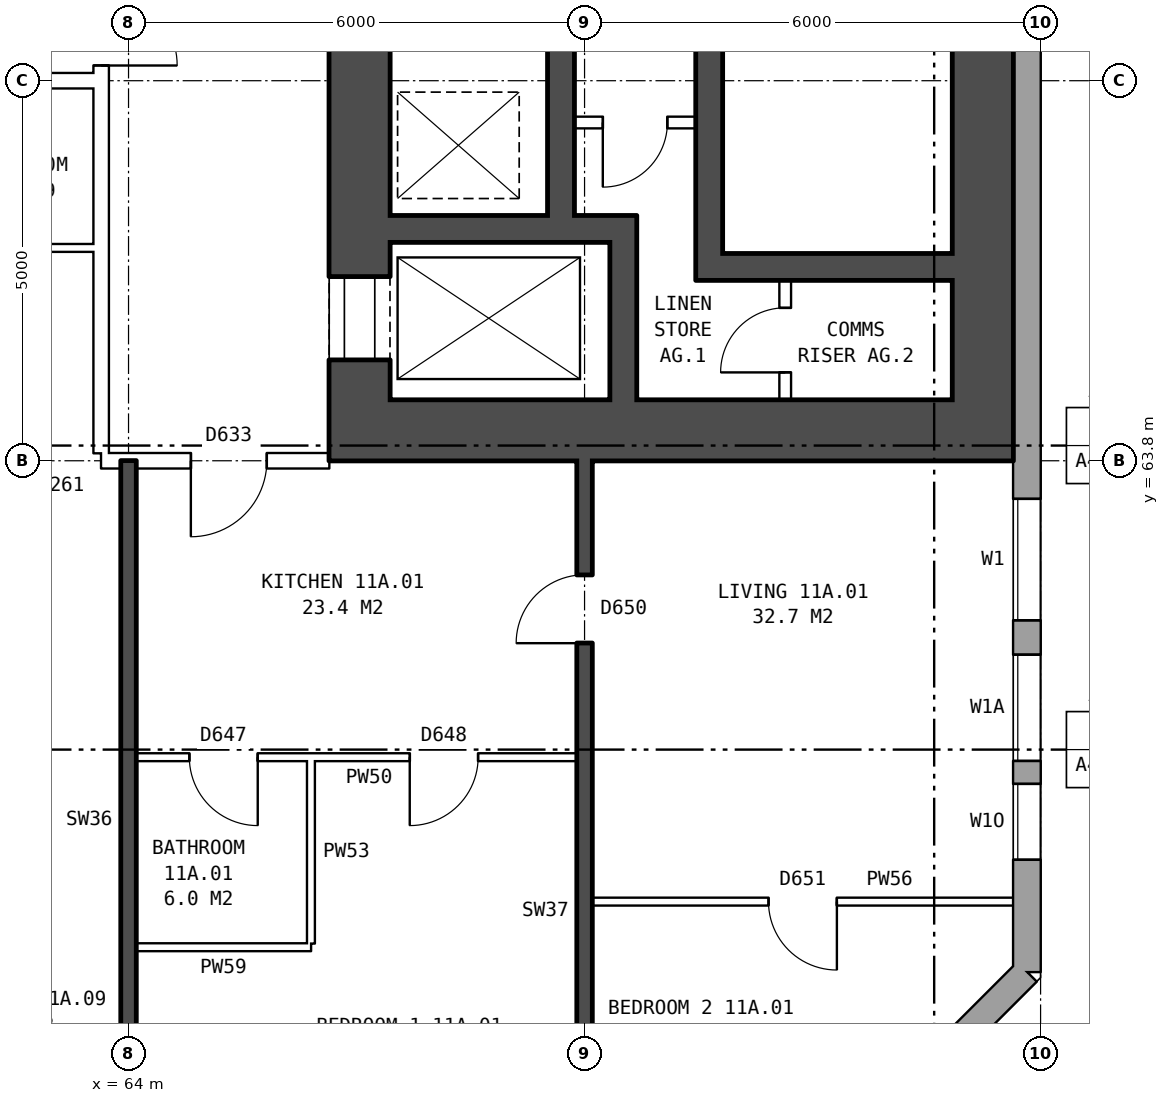
"""IFC4 building model, lengths in metres.
Left out: names, types, materials, properties, quantities, classifications, styles, units other than length and angle.
Written with IfcOpenShell. Run it as: python <this file> out.ifc"""

import sys

from ifc_helpers import new_model, si_unit, direction, frame, frame_2d, origin, place, context, subcontext, project, spatial, rectangle, extrude, element, fill, save


model = new_model("IFC4")
c1 = context("Model", 3, precision=1e-05, world=origin(), true_north=direction((0.0, 1.0)))
c2 = subcontext(c1, "Body", "Model", "MODEL_VIEW")
j1 = project(units=[si_unit("LENGTHUNIT", "METRE"), si_unit("PLANEANGLEUNIT", "RADIAN")], contexts=[c1])
p1 = place(None, origin())
s1 = spatial("IfcSite", under=j1, at=p1, CompositionType="ELEMENT")
p2 = place(p1, origin())
s2 = spatial("IfcBuilding", under=s1, at=p2, CompositionType="ELEMENT")
p3 = place(p2, frame((0.0, 0.0, 44.3)))
s3 = spatial("IfcBuildingStorey", under=s2, at=p3, CompositionType="ELEMENT", Elevation=44.3)
p4 = place(p3, frame((72.925, 54.18, 0.0), z_axis=(0.0, 0.0, 1.0), x_axis=(0.707106781187, 0.707106781187, 0.0)))
e1 = element("IfcWall", 1, at=p4, inside=s3, PredefinedType="STANDARD", context=c2, shape_type="SweptSolid", body=[
    extrude(rectangle(XDim=4.094, YDim=0.36, at=frame_2d((2.047, 0.0))), origin(), (0.0, 0.0, 1.0), 2.85),
])
p5 = place(p4, frame((1.247, 0.0, 0.8)))
e2 = element("IfcOpeningElement", 2, at=p5, cuts=e1, PredefinedType="OPENING", context=c2, shape_type="SweptSolid", body=[
    extrude(rectangle(XDim=1.6, YDim=1.8, at=frame_2d((0.8, 0.9))), frame((0.0, 0.19, 0.0), z_axis=(0.0, -1.0, 0.0), x_axis=(1.0, 0.0, 0.0)), (0.0, 0.0, 1.0), 0.38),
])
p6 = place(p3, frame((75.82, 57.075, 0.0), z_axis=(0.0, 0.0, 1.0), x_axis=(0.0, 1.0, 0.0)))
e3 = element("IfcWall", 3, at=p6, inside=s3, PredefinedType="STANDARD", context=c2, shape_type="SweptSolid", body=[
    extrude(rectangle(XDim=25.851, YDim=0.36, at=frame_2d((12.925, 0.0))), origin(), (0.0, 0.0, 1.0), 2.85),
])
p7 = place(p6, frame((1.475, 0.0, 0.8)))
e4 = element("IfcOpeningElement", 4, at=p7, cuts=e3, PredefinedType="OPENING", context=c2, shape_type="SweptSolid", body=[
    extrude(rectangle(XDim=1.0, YDim=1.2, at=frame_2d((0.5, 0.6))), frame((0.0, 0.19, 0.0), z_axis=(0.0, -1.0, 0.0), x_axis=(1.0, 0.0, 0.0)), (0.0, 0.0, 1.0), 0.38),
])
p8 = place(p6, frame((4.625, 0.0, 0.8)))
e5 = element("IfcOpeningElement", 5, at=p8, cuts=e3, PredefinedType="OPENING", context=c2, shape_type="SweptSolid", body=[
    extrude(rectangle(XDim=1.6, YDim=1.8, at=frame_2d((0.8, 0.9))), frame((0.0, 0.19, 0.0), z_axis=(0.0, -1.0, 0.0), x_axis=(1.0, 0.0, 0.0)), (0.0, 0.0, 1.0), 0.38),
])
p9 = place(p6, frame((19.625, 0.0, 0.8)))
e6 = element("IfcOpeningElement", 6, at=p9, cuts=e3, PredefinedType="OPENING", context=c2, shape_type="SweptSolid", body=[
    extrude(rectangle(XDim=1.6, YDim=1.8, at=frame_2d((0.8, 0.9))), frame((0.0, 0.19, 0.0), z_axis=(0.0, -1.0, 0.0), x_axis=(1.0, 0.0, 0.0)), (0.0, 0.0, 1.0), 0.38),
])
p10 = place(p6, frame((22.075, 0.0, 0.8)))
e7 = element("IfcOpeningElement", 7, at=p10, cuts=e3, PredefinedType="OPENING", context=c2, shape_type="SweptSolid", body=[
    extrude(rectangle(XDim=1.2, YDim=1.8, at=frame_2d((0.6, 0.9))), frame((0.0, 0.19, 0.0), z_axis=(0.0, -1.0, 0.0), x_axis=(1.0, 0.0, 0.0)), (0.0, 0.0, 1.0), 0.38),
])
p11 = place(p6, frame((2.775, 0.0, 0.8)))
e8 = element("IfcOpeningElement", 8, at=p11, cuts=e3, PredefinedType="OPENING", context=c2, shape_type="SweptSolid", body=[
    extrude(rectangle(XDim=1.4, YDim=1.8, at=frame_2d((0.7, 0.9))), frame((0.0, 0.19, 0.0), z_axis=(0.0, -1.0, 0.0), x_axis=(1.0, 0.0, 0.0)), (0.0, 0.0, 1.0), 0.38),
])
p12 = place(p6, frame((23.575, 0.0, 0.8)))
e9 = element("IfcOpeningElement", 9, at=p12, cuts=e3, PredefinedType="OPENING", context=c2, shape_type="SweptSolid", body=[
    extrude(rectangle(XDim=1.2, YDim=0.9, at=frame_2d((0.6, 0.45))), frame((0.0, 0.19, 0.0), z_axis=(0.0, -1.0, 0.0), x_axis=(1.0, 0.0, 0.0)), (0.0, 0.0, 1.0), 0.38),
])
p13 = place(p3, frame((67.04, 64.6, 0.0), z_axis=(0.0, 0.0, 1.0), x_axis=(0.0, 1.0, 0.0)))
e10 = element("IfcWall", 10, at=p13, inside=s3, PredefinedType="SHEAR", context=c2, shape_type="SweptSolid", body=[
    extrude(rectangle(XDim=10.8, YDim=0.8, at=frame_2d((5.4, 0.0))), origin(), (0.0, 0.0, 1.0), 2.85),
])
p14 = place(p13, frame((0.525, 0.0, 0.0)))
e11 = element("IfcOpeningElement", 11, at=p14, cuts=e10, PredefinedType="OPENING", context=c2, shape_type="SweptSolid", body=[
    extrude(rectangle(XDim=1.1, YDim=2.1, at=frame_2d((0.55, 1.05))), frame((0.0, 0.41, 0.0), z_axis=(0.0, -1.0, 0.0), x_axis=(1.0, 0.0, 0.0)), (0.0, 0.0, 1.0), 0.82),
])
p15 = place(p13, frame((9.1, 0.0, 0.0)))
e12 = element("IfcOpeningElement", 12, at=p15, cuts=e10, PredefinedType="OPENING", context=c2, shape_type="SweptSolid", body=[
    extrude(rectangle(XDim=1.1, YDim=2.1, at=frame_2d((0.55, 1.05))), frame((0.0, 0.41, 0.0), z_axis=(0.0, -1.0, 0.0), x_axis=(1.0, 0.0, 0.0)), (0.0, 0.0, 1.0), 0.82),
])
p16 = place(p3, frame((75.24, 64.6, 0.0), z_axis=(0.0, 0.0, 1.0), x_axis=(0.0, 1.0, 0.0)))
e13 = element("IfcWall", 13, at=p16, inside=s3, PredefinedType="SHEAR", context=c2, shape_type="SweptSolid", body=[
    extrude(rectangle(XDim=10.8, YDim=0.8, at=frame_2d((5.4, 0.0))), origin(), (0.0, 0.0, 1.0), 2.85),
])
p17 = place(p3, frame((66.64, 64.2, 0.0), z_axis=(0.0, 0.0, 1.0), x_axis=(1.0, 0.0, 0.0)))
e14 = element("IfcWall", 14, at=p17, inside=s3, PredefinedType="SHEAR", context=c2, shape_type="SweptSolid", body=[
    extrude(rectangle(XDim=9.0, YDim=0.8, at=frame_2d((4.5, 0.0))), origin(), (0.0, 0.0, 1.0), 2.85),
])
p18 = place(p3, frame((71.815, 66.35, 0.0), z_axis=(0.0, 0.0, 1.0), x_axis=(1.0, 0.0, 0.0)))
e15 = element("IfcWall", 15, at=p18, inside=s3, PredefinedType="SHEAR", context=c2, shape_type="SweptSolid", body=[
    extrude(rectangle(XDim=3.025, YDim=0.35, at=frame_2d((1.513, 0.0))), origin(), (0.0, 0.0, 1.0), 2.85),
])
p19 = place(p3, frame((67.44, 66.85, 0.0), z_axis=(0.0, 0.0, 1.0), x_axis=(1.0, 0.0, 0.0)))
e16 = element("IfcWall", 16, at=p19, inside=s3, PredefinedType="SHEAR", context=c2, shape_type="SweptSolid", body=[
    extrude(rectangle(XDim=3.245, YDim=0.35, at=frame_2d((1.623, 0.0))), origin(), (0.0, 0.0, 1.0), 2.85),
])
p20 = place(p3, frame((69.865, 68.25, 0.0), z_axis=(0.0, 0.0, 1.0), x_axis=(1.0, 0.0, 0.0)))
e17 = element("IfcWall", 17, at=p20, inside=s3, PredefinedType="PARTITIONING", context=c2, shape_type="SweptSolid", body=[
    extrude(rectangle(XDim=1.6, YDim=0.15, at=frame_2d((0.8, 0.0))), origin(), (0.0, 0.0, 1.0), 2.85),
])
p21 = place(p20, frame((0.375, 0.0, 0.0)))
e18 = element("IfcOpeningElement", 18, at=p21, cuts=e17, PredefinedType="OPENING", context=c2, shape_type="SweptSolid", body=[
    extrude(rectangle(XDim=0.85, YDim=2.1, at=frame_2d((0.425, 1.05))), frame((0.0, 0.085, 0.0), z_axis=(0.0, -1.0, 0.0), x_axis=(1.0, 0.0, 0.0)), (0.0, 0.0, 1.0), 0.17),
])
p22 = place(p3, frame((69.69, 67.025, 0.0), z_axis=(0.0, 0.0, 1.0), x_axis=(0.0, 1.0, 0.0)))
e19 = element("IfcWall", 19, at=p22, inside=s3, PredefinedType="SHEAR", context=c2, shape_type="SweptSolid", body=[
    extrude(rectangle(XDim=6.6, YDim=0.35, at=frame_2d((3.3, 0.0))), origin(), (0.0, 0.0, 1.0), 2.85),
])
p23 = place(p3, frame((70.51, 64.6, 0.0), z_axis=(0.0, 0.0, 1.0), x_axis=(0.0, 1.0, 0.0)))
e20 = element("IfcWall", 20, at=p23, inside=s3, PredefinedType="SHEAR", context=c2, shape_type="SweptSolid", body=[
    extrude(rectangle(XDim=2.075, YDim=0.35, at=frame_2d((1.038, 0.0))), origin(), (0.0, 0.0, 1.0), 2.85),
])
p24 = place(p3, frame((71.64, 66.175, 0.0), z_axis=(0.0, 0.0, 1.0), x_axis=(0.0, 1.0, 0.0)))
e21 = element("IfcWall", 21, at=p24, inside=s3, PredefinedType="SHEAR", context=c2, shape_type="SweptSolid", body=[
    extrude(rectangle(XDim=7.45, YDim=0.35, at=frame_2d((3.725, 0.0))), origin(), (0.0, 0.0, 1.0), 2.85),
])
p25 = place(p3, frame((72.64, 64.6, 0.0), z_axis=(0.0, 0.0, 1.0), x_axis=(0.0, 1.0, 0.0)))
e22 = element("IfcWall", 22, at=p25, inside=s3, PredefinedType="PARTITIONING", context=c2, shape_type="SweptSolid", body=[
    extrude(rectangle(XDim=1.575, YDim=0.15, at=frame_2d((0.788, 0.0))), origin(), (0.0, 0.0, 1.0), 2.85),
])
p26 = place(p25, frame((0.363, 0.0, 0.0)))
e23 = element("IfcOpeningElement", 23, at=p26, cuts=e22, PredefinedType="OPENING", context=c2, shape_type="SweptSolid", body=[
    extrude(rectangle(XDim=0.85, YDim=2.1, at=frame_2d((0.425, 1.05))), frame((0.0, 0.085, 0.0), z_axis=(0.0, -1.0, 0.0), x_axis=(1.0, 0.0, 0.0)), (0.0, 0.0, 1.0), 0.17),
])
p27 = place(p3, frame((63.64, 63.9, 0.0), z_axis=(0.0, 0.0, 1.0), x_axis=(0.0, 1.0, 0.0)))
e24 = element("IfcWall", 24, at=p27, inside=s3, PredefinedType="PARTITIONING", context=c2, shape_type="SweptSolid", body=[
    extrude(rectangle(XDim=12.2, YDim=0.2, at=frame_2d((6.1, 0.0))), origin(), (0.0, 0.0, 1.0), 2.85),
])
p28 = place(p27, frame((5.1, 0.0, 0.0)))
e25 = element("IfcOpeningElement", 25, at=p28, cuts=e24, PredefinedType="OPENING", context=c2, shape_type="SweptSolid", body=[
    extrude(rectangle(XDim=2.0, YDim=2.1, at=frame_2d((1.0, 1.05))), frame((0.0, 0.11, 0.0), z_axis=(0.0, -1.0, 0.0), x_axis=(1.0, 0.0, 0.0)), (0.0, 0.0, 1.0), 0.22),
])
p29 = place(p3, frame((64.1, 57.4, 0.0), z_axis=(0.0, 0.0, 1.0), x_axis=(1.0, 0.0, 0.0)))
e26 = element("IfcWall", 26, at=p29, inside=s3, PredefinedType="PARTITIONING", context=c2, shape_type="SweptSolid", body=[
    extrude(rectangle(XDim=2.3, YDim=0.1, at=frame_2d((1.15, 0.0))), origin(), (0.0, 0.0, 1.0), 2.85),
])
p30 = place(p3, frame((70.1, 58.0, 0.0), z_axis=(0.0, 0.0, 1.0), x_axis=(1.0, 0.0, 0.0)))
e27 = element("IfcWall", 27, at=p30, inside=s3, PredefinedType="PARTITIONING", context=c2, shape_type="SweptSolid", body=[
    extrude(rectangle(XDim=5.54, YDim=0.1, at=frame_2d((2.77, 0.0))), origin(), (0.0, 0.0, 1.0), 2.85),
])
p31 = place(p30, frame((2.32, 0.0, 0.0)))
e28 = element("IfcOpeningElement", 28, at=p31, cuts=e27, PredefinedType="OPENING", context=c2, shape_type="SweptSolid", body=[
    extrude(rectangle(XDim=0.9, YDim=2.1, at=frame_2d((0.45, 1.05))), frame((0.0, 0.06, 0.0), z_axis=(0.0, -1.0, 0.0), x_axis=(1.0, 0.0, 0.0)), (0.0, 0.0, 1.0), 0.12),
])
p32 = place(p3, frame((64.1, 59.9, 0.0), z_axis=(0.0, 0.0, 1.0), x_axis=(1.0, 0.0, 0.0)))
e29 = element("IfcWall", 29, at=p32, inside=s3, PredefinedType="PARTITIONING", context=c2, shape_type="SweptSolid", body=[
    extrude(rectangle(XDim=5.8, YDim=0.1, at=frame_2d((2.9, 0.0))), origin(), (0.0, 0.0, 1.0), 2.85),
])
p33 = place(p32, frame((3.6, 0.0, 0.0)))
e30 = element("IfcOpeningElement", 30, at=p33, cuts=e29, PredefinedType="OPENING", context=c2, shape_type="SweptSolid", body=[
    extrude(rectangle(XDim=0.9, YDim=2.1, at=frame_2d((0.45, 1.05))), frame((0.0, 0.06, 0.0), z_axis=(0.0, -1.0, 0.0), x_axis=(1.0, 0.0, 0.0)), (0.0, 0.0, 1.0), 0.12),
])
p34 = place(p32, frame((0.7, 0.0, 0.0)))
e31 = element("IfcOpeningElement", 31, at=p34, cuts=e29, PredefinedType="OPENING", context=c2, shape_type="SweptSolid", body=[
    extrude(rectangle(XDim=0.9, YDim=2.1, at=frame_2d((0.45, 1.05))), frame((0.0, 0.06, 0.0), z_axis=(0.0, -1.0, 0.0), x_axis=(1.0, 0.0, 0.0)), (0.0, 0.0, 1.0), 0.12),
])
p35 = place(p3, frame((63.64, 63.8, 0.0), z_axis=(0.0, 0.0, 1.0), x_axis=(1.0, 0.0, 0.0)))
e32 = element("IfcWall", 32, at=p35, inside=s3, PredefinedType="PARTITIONING", context=c2, shape_type="SweptSolid", body=[
    extrude(rectangle(XDim=3.0, YDim=0.2, at=frame_2d((1.5, 0.0))), origin(), (0.0, 0.0, 1.0), 2.85),
])
p36 = place(p35, frame((1.18, 0.0, 0.0)))
e33 = element("IfcOpeningElement", 33, at=p36, cuts=e32, PredefinedType="OPENING", context=c2, shape_type="SweptSolid", body=[
    extrude(rectangle(XDim=1.0, YDim=2.1, at=frame_2d((0.5, 1.05))), frame((0.0, 0.11, 0.0), z_axis=(0.0, -1.0, 0.0), x_axis=(1.0, 0.0, 0.0)), (0.0, 0.0, 1.0), 0.22),
])
p37 = place(p3, frame((61.0, 66.6, 0.0), z_axis=(0.0, 0.0, 1.0), x_axis=(1.0, 0.0, 0.0)))
e34 = element("IfcWall", 34, at=p37, inside=s3, PredefinedType="PARTITIONING", context=c2, shape_type="SweptSolid", body=[
    extrude(rectangle(XDim=2.64, YDim=0.1, at=frame_2d((1.32, 0.0))), origin(), (0.0, 0.0, 1.0), 2.85),
])
p38 = place(p3, frame((44.36, 68.8, 0.0), z_axis=(0.0, 0.0, 1.0), x_axis=(1.0, 0.0, 0.0)))
e35 = element("IfcWall", 35, at=p38, inside=s3, PredefinedType="PARTITIONING", context=c2, shape_type="SweptSolid", body=[
    extrude(rectangle(XDim=19.28, YDim=0.2, at=frame_2d((9.64, 0.0))), origin(), (0.0, 0.0, 1.0), 2.85),
])
p39 = place(p38, frame((14.64, 0.0, 0.0)))
e36 = element("IfcOpeningElement", 36, at=p39, cuts=e35, PredefinedType="OPENING", context=c2, shape_type="SweptSolid", body=[
    extrude(rectangle(XDim=1.0, YDim=2.1, at=frame_2d((0.5, 1.05))), frame((0.0, 0.11, 0.0), z_axis=(0.0, -1.0, 0.0), x_axis=(1.0, 0.0, 0.0)), (0.0, 0.0, 1.0), 0.22),
])
p40 = place(p38, frame((5.64, 0.0, 0.0)))
e37 = element("IfcOpeningElement", 37, at=p40, cuts=e35, PredefinedType="OPENING", context=c2, shape_type="SweptSolid", body=[
    extrude(rectangle(XDim=1.0, YDim=2.1, at=frame_2d((0.5, 1.05))), frame((0.0, 0.11, 0.0), z_axis=(0.0, -1.0, 0.0), x_axis=(1.0, 0.0, 0.0)), (0.0, 0.0, 1.0), 0.22),
])
p41 = place(p3, frame((64.0, 54.36, 0.0), z_axis=(0.0, 0.0, 1.0), x_axis=(0.0, 1.0, 0.0)))
e38 = element("IfcWall", 38, at=p41, inside=s3, PredefinedType="SOLIDWALL", context=c2, shape_type="SweptSolid", body=[
    extrude(rectangle(XDim=9.44, YDim=0.2, at=frame_2d((4.72, 0.0))), origin(), (0.0, 0.0, 1.0), 2.85),
])
p42 = place(p3, frame((66.4, 57.45, 0.0), z_axis=(0.0, 0.0, 1.0), x_axis=(0.0, 1.0, 0.0)))
e39 = element("IfcWall", 39, at=p42, inside=s3, PredefinedType="PARTITIONING", context=c2, shape_type="SweptSolid", body=[
    extrude(rectangle(XDim=2.4, YDim=0.1, at=frame_2d((1.2, 0.0))), origin(), (0.0, 0.0, 1.0), 2.85),
])
p43 = place(p3, frame((70.0, 54.36, 0.0), z_axis=(0.0, 0.0, 1.0), x_axis=(0.0, 1.0, 0.0)))
e40 = element("IfcWall", 40, at=p43, inside=s3, PredefinedType="SOLIDWALL", context=c2, shape_type="SweptSolid", body=[
    extrude(rectangle(XDim=9.44, YDim=0.2, at=frame_2d((4.72, 0.0))), origin(), (0.0, 0.0, 1.0), 2.85),
])
p44 = place(p43, frame((7.04, 0.0, 0.0)))
e41 = element("IfcOpeningElement", 41, at=p44, cuts=e40, PredefinedType="OPENING", context=c2, shape_type="SweptSolid", body=[
    extrude(rectangle(XDim=0.9, YDim=2.1, at=frame_2d((0.45, 1.05))), frame((0.0, 0.11, 0.0), z_axis=(0.0, -1.0, 0.0), x_axis=(1.0, 0.0, 0.0)), (0.0, 0.0, 1.0), 0.22),
])
p45 = place(p7, origin())
e42 = element("IfcWindow", 42, at=p45, inside=s3, PartitioningType="SINGLE_PANEL", PredefinedType="WINDOW", context=c2, shape_type="SweptSolid", body=[
    extrude(rectangle(XDim=1.0, YDim=1.2, at=frame_2d((0.5, 0.6))), frame((0.0, 0.15, 0.0), z_axis=(0.0, -1.0, 0.0), x_axis=(1.0, 0.0, 0.0)), (0.0, 0.0, 1.0), 0.06),
])
fill(e4, e42)
p46 = place(p8, origin())
e43 = element("IfcWindow", 43, at=p46, inside=s3, PartitioningType="SINGLE_PANEL", PredefinedType="WINDOW", context=c2, shape_type="SweptSolid", body=[
    extrude(rectangle(XDim=1.6, YDim=1.8, at=frame_2d((0.8, 0.9))), frame((0.0, 0.15, 0.0), z_axis=(0.0, -1.0, 0.0), x_axis=(1.0, 0.0, 0.0)), (0.0, 0.0, 1.0), 0.06),
])
fill(e5, e43)
p47 = place(p14, origin())
e44 = element("IfcDoor", 44, at=p47, inside=s3, OperationType="DOUBLE_DOOR_SLIDING", PredefinedType="DOOR", context=c2, shape_type="SweptSolid", body=[
    extrude(rectangle(XDim=1.1, YDim=2.1, at=frame_2d((0.55, 1.05))), frame((0.0, -0.335, 0.0), z_axis=(0.0, -1.0, 0.0), x_axis=(1.0, 0.0, 0.0)), (0.0, 0.0, 1.0), 0.05),
])
fill(e11, e44)
p48 = place(p21, frame((0.85, 0.0, 0.0), z_axis=(0.0, 0.0, 1.0), x_axis=(-1.0, 0.0, 0.0)))
e45 = element("IfcDoor", 45, at=p48, inside=s3, OperationType="SINGLE_SWING_RIGHT", PredefinedType="DOOR", context=c2, shape_type="SweptSolid", body=[
    extrude(rectangle(XDim=0.85, YDim=2.1, at=frame_2d((0.425, 1.05))), frame((0.0, 0.025, 0.0), z_axis=(0.0, -1.0, 0.0), x_axis=(1.0, 0.0, 0.0)), (0.0, 0.0, 1.0), 0.05),
])
fill(e18, e45)
p49 = place(p26, origin())
e46 = element("IfcDoor", 46, at=p49, inside=s3, OperationType="SINGLE_SWING_LEFT", PredefinedType="DOOR", context=c2, shape_type="SweptSolid", body=[
    extrude(rectangle(XDim=0.85, YDim=2.1, at=frame_2d((0.425, 1.05))), frame((0.0, 0.025, 0.0), z_axis=(0.0, -1.0, 0.0), x_axis=(1.0, 0.0, 0.0)), (0.0, 0.0, 1.0), 0.05),
])
fill(e23, e46)
p50 = place(p28, frame((2.0, 0.0, 0.0), z_axis=(0.0, 0.0, 1.0), x_axis=(-1.0, 0.0, 0.0)))
e47 = element("IfcDoor", 47, at=p50, inside=s3, OperationType="DOUBLE_DOOR_SINGLE_SWING", PredefinedType="DOOR", context=c2, shape_type="SweptSolid", body=[
    extrude(rectangle(XDim=2.0, YDim=2.1, at=frame_2d((1.0, 1.05))), frame((0.0, 0.025, 0.0), z_axis=(0.0, -1.0, 0.0), x_axis=(1.0, 0.0, 0.0)), (0.0, 0.0, 1.0), 0.05),
])
fill(e25, e47)
p51 = place(p33, frame((0.9, 0.0, 0.0), z_axis=(0.0, 0.0, 1.0), x_axis=(-1.0, 0.0, 0.0)))
e48 = element("IfcDoor", 48, at=p51, inside=s3, OperationType="SINGLE_SWING_RIGHT", PredefinedType="DOOR", context=c2, shape_type="SweptSolid", body=[
    extrude(rectangle(XDim=0.9, YDim=2.1, at=frame_2d((0.45, 1.05))), frame((0.0, 0.025, 0.0), z_axis=(0.0, -1.0, 0.0), x_axis=(1.0, 0.0, 0.0)), (0.0, 0.0, 1.0), 0.05),
])
fill(e30, e48)
p52 = place(p31, frame((0.9, 0.0, 0.0), z_axis=(0.0, 0.0, 1.0), x_axis=(-1.0, 0.0, 0.0)))
e49 = element("IfcDoor", 49, at=p52, inside=s3, OperationType="SINGLE_SWING_LEFT", PredefinedType="DOOR", context=c2, shape_type="SweptSolid", body=[
    extrude(rectangle(XDim=0.9, YDim=2.1, at=frame_2d((0.45, 1.05))), frame((0.0, 0.025, 0.0), z_axis=(0.0, -1.0, 0.0), x_axis=(1.0, 0.0, 0.0)), (0.0, 0.0, 1.0), 0.05),
])
fill(e28, e49)
p53 = place(p36, frame((1.0, 0.0, 0.0), z_axis=(0.0, 0.0, 1.0), x_axis=(-1.0, 0.0, 0.0)))
e50 = element("IfcDoor", 50, at=p53, inside=s3, OperationType="SINGLE_SWING_RIGHT", PredefinedType="DOOR", context=c2, shape_type="SweptSolid", body=[
    extrude(rectangle(XDim=1.0, YDim=2.1, at=frame_2d((0.5, 1.05))), frame((0.0, 0.025, 0.0), z_axis=(0.0, -1.0, 0.0), x_axis=(1.0, 0.0, 0.0)), (0.0, 0.0, 1.0), 0.05),
])
fill(e33, e50)
p54 = place(p44, origin())
e51 = element("IfcDoor", 51, at=p54, inside=s3, OperationType="SINGLE_SWING_LEFT", PredefinedType="DOOR", context=c2, shape_type="SweptSolid", body=[
    extrude(rectangle(XDim=0.9, YDim=2.1, at=frame_2d((0.45, 1.05))), frame((0.0, 0.025, 0.0), z_axis=(0.0, -1.0, 0.0), x_axis=(1.0, 0.0, 0.0)), (0.0, 0.0, 1.0), 0.05),
])
fill(e41, e51)
p55 = place(p34, frame((0.9, 0.0, 0.0), z_axis=(0.0, 0.0, 1.0), x_axis=(-1.0, 0.0, 0.0)))
e52 = element("IfcDoor", 52, at=p55, inside=s3, OperationType="SINGLE_SWING_LEFT", PredefinedType="DOOR", context=c2, shape_type="SweptSolid", body=[
    extrude(rectangle(XDim=0.9, YDim=2.1, at=frame_2d((0.45, 1.05))), frame((0.0, 0.025, 0.0), z_axis=(0.0, -1.0, 0.0), x_axis=(1.0, 0.0, 0.0)), (0.0, 0.0, 1.0), 0.05),
])
fill(e31, e52)
p56 = place(p11, origin())
e53 = element("IfcWindow", 53, at=p56, inside=s3, PartitioningType="SINGLE_PANEL", PredefinedType="WINDOW", context=c2, shape_type="SweptSolid", body=[
    extrude(rectangle(XDim=1.4, YDim=1.8, at=frame_2d((0.7, 0.9))), frame((0.0, 0.15, 0.0), z_axis=(0.0, -1.0, 0.0), x_axis=(1.0, 0.0, 0.0)), (0.0, 0.0, 1.0), 0.06),
])
fill(e8, e53)
save(model, sys.argv[1])
